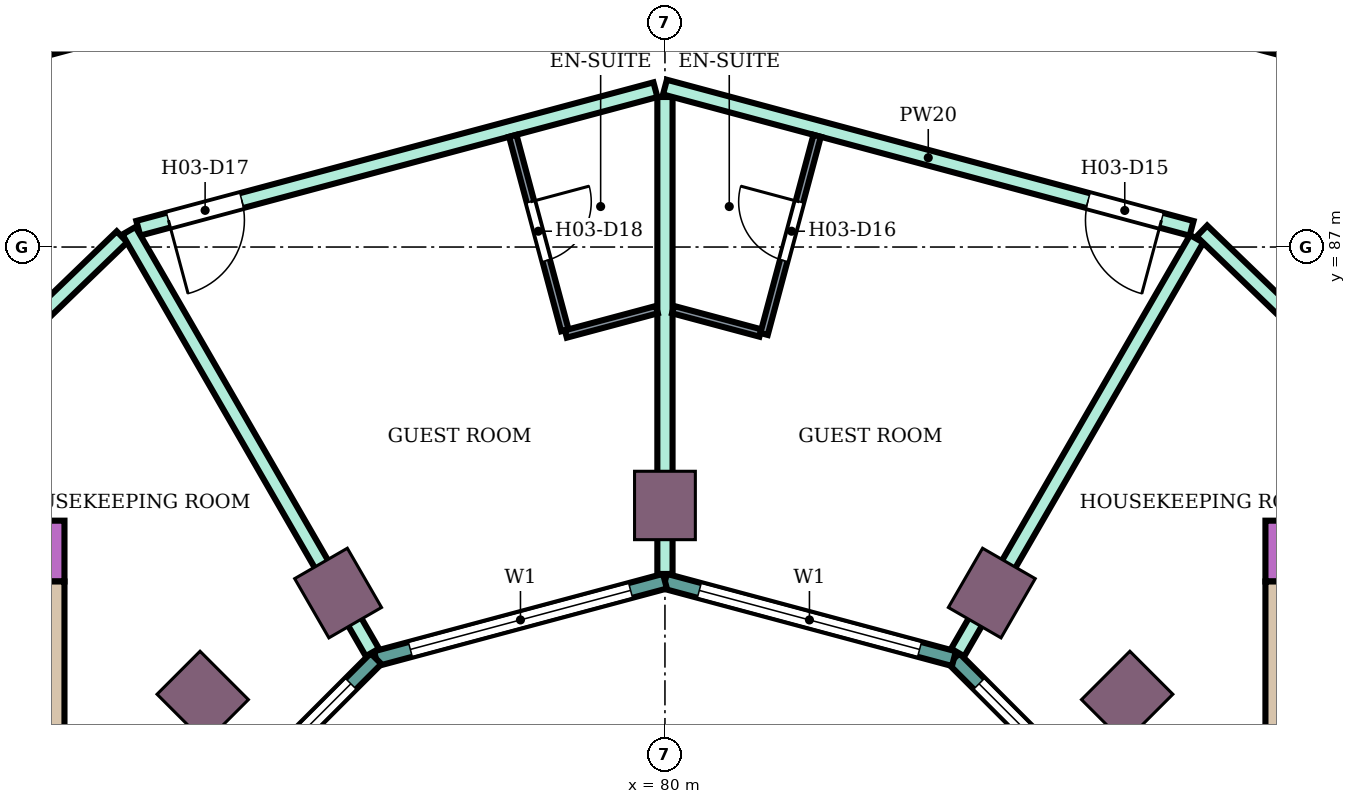
"""IFC4 building model, lengths in metres.
Left out: names, types, materials, properties, quantities, classifications, styles, units other than length and angle.
Written with IfcOpenShell. Run it as: python <this file> out.ifc"""

import sys

from ifc_helpers import new_model, si_unit, direction, frame, frame_2d, origin, origin_2d, place, context, subcontext, project, spatial, rectangle, extrude, element, fill, save


model = new_model("IFC4")
c1 = context("Model", 3, precision=1e-05, world=origin(), true_north=direction((0.0, 1.0)))
c2 = subcontext(c1, "Body", "Model", "MODEL_VIEW")
j1 = project(units=[si_unit("LENGTHUNIT", "METRE"), si_unit("PLANEANGLEUNIT", "RADIAN")], contexts=[c1])
p1 = place(None, origin())
s1 = spatial("IfcSite", under=j1, at=p1, CompositionType="ELEMENT")
p2 = place(p1, origin())
s2 = spatial("IfcBuilding", under=s1, at=p2, CompositionType="ELEMENT")
p3 = place(p2, frame((0.0, 0.0, 55.4)))
s3 = spatial("IfcBuildingStorey", under=s2, at=p3, CompositionType="ELEMENT", Elevation=55.4)
for number, where, z_axis, x_axis in (
    (1, (86.081, 81.081, 0.0), (0.0, 0.0, 1.0), (0.707, 0.707, 0.0)),
    (2, (84.3, 82.448, 0.0), (0.0, 0.0, 1.0), (0.5, 0.866, 0.0)),
    (3, (80.0, 83.6, 0.0), (0.0, 0.0, 1.0), (0.0, 1.0, 0.0)),
    (4, (75.7, 82.448, 0.0), (0.0, 0.0, 1.0), (-0.5, 0.866, 0.0)),
    (5, (73.919, 81.081, 0.0), (0.0, 0.0, 1.0), (-0.707, 0.707, 0.0)),
):
    element("IfcColumn", number, at=place(p3, frame(where, z_axis=z_axis, x_axis=x_axis)), inside=s3, PredefinedType="COLUMN", context=c2, shape_type="SweptSolid", body=[
        extrude(rectangle(XDim=0.9, YDim=0.8, at=origin_2d()), origin(), (0.0, 0.0, 1.0), 3.8),
    ])
p4 = place(p3, frame((87.9, 83.0, 0.0), z_axis=(0.0, 0.0, 1.0), x_axis=(1.0, 0.0, 0.0)))
e6 = element("IfcWall", 6, at=p4, inside=s3, PredefinedType="SHEAR", context=c2, shape_type="SweptSolid", body=[
    extrude(rectangle(XDim=14.7, YDim=0.8, at=frame_2d((7.35, 0.0))), origin(), (0.0, 0.0, 1.0), 3.48),
])
p5 = place(p4, frame((4.2, 0.0, 0.0)))
e7 = element("IfcOpeningElement", 7, at=p5, cuts=e6, PredefinedType="OPENING", context=c2, shape_type="SweptSolid", body=[
    extrude(rectangle(XDim=2.4, YDim=2.4, at=frame_2d((1.2, 1.2))), frame((0.0, 0.41, 0.0), z_axis=(0.0, -1.0, 0.0), x_axis=(1.0, 0.0, 0.0)), (0.0, 0.0, 1.0), 0.82),
])
p6 = place(p3, frame((88.125, 75.0, 0.0), z_axis=(0.0, 0.0, 1.0), x_axis=(0.0, 1.0, 0.0)))
e8 = element("IfcWall", 8, at=p6, inside=s3, PredefinedType="SHEAR", context=c2, shape_type="SweptSolid", body=[
    extrude(rectangle(XDim=7.6, YDim=0.45, at=frame_2d((3.8, 0.0))), origin(), (0.0, 0.0, 1.0), 3.48),
])
p7 = place(p3, frame((72.1, 83.0, 0.0), z_axis=(0.0, 0.0, 1.0), x_axis=(-1.0, 0.0, 0.0)))
e9 = element("IfcWall", 9, at=p7, inside=s3, PredefinedType="SHEAR", context=c2, shape_type="SweptSolid", body=[
    extrude(rectangle(XDim=14.7, YDim=0.8, at=frame_2d((7.35, 0.0))), origin(), (0.0, 0.0, 1.0), 3.48),
])
p8 = place(p7, frame((4.2, 0.0, 0.0)))
e10 = element("IfcOpeningElement", 10, at=p8, cuts=e9, PredefinedType="OPENING", context=c2, shape_type="SweptSolid", body=[
    extrude(rectangle(XDim=2.4, YDim=2.4, at=frame_2d((1.2, 1.2))), frame((0.0, 0.41, 0.0), z_axis=(0.0, -1.0, 0.0), x_axis=(1.0, 0.0, 0.0)), (0.0, 0.0, 1.0), 0.82),
])
p9 = place(p3, frame((71.875, 82.6, 0.0), z_axis=(0.0, 0.0, 1.0), x_axis=(0.0, -1.0, 0.0)))
e11 = element("IfcWall", 11, at=p9, inside=s3, PredefinedType="SHEAR", context=c2, shape_type="SweptSolid", body=[
    extrude(rectangle(XDim=7.6, YDim=0.45, at=frame_2d((3.8, 0.0))), origin(), (0.0, 0.0, 1.0), 3.48),
])
p10 = place(p3, frame((86.585, 78.802, 0.0), z_axis=(0.0, 0.0, 1.0), x_axis=(-0.707106781187, 0.707106781187, 0.0)))
e12 = element("IfcWall", 12, at=p10, inside=s3, PredefinedType="NOTDEFINED", context=c2, shape_type="SweptSolid", body=[
    extrude(rectangle(XDim=3.936, YDim=0.2, at=frame_2d((1.968, 0.0))), origin(), (0.0, 0.0, 1.0), 3.8),
])
p11 = place(p10, frame((0.468, 0.0, 0.9)))
e13 = element("IfcOpeningElement", 13, at=p11, cuts=e12, PredefinedType="OPENING", context=c2, shape_type="SweptSolid", body=[
    extrude(rectangle(XDim=3.0, YDim=2.3, at=frame_2d((1.5, 1.15))), frame((0.0, 0.11, 0.0), z_axis=(0.0, -1.0, 0.0), x_axis=(1.0, 0.0, 0.0)), (0.0, 0.0, 1.0), 0.22),
])
p12 = place(p3, frame((83.802, 81.585, 0.0), z_axis=(0.0, 0.0, 1.0), x_axis=(-0.965933654434, 0.258789828301, 0.0)))
e14 = element("IfcWall", 14, at=p12, inside=s3, PredefinedType="NOTDEFINED", context=c2, shape_type="SweptSolid", body=[
    extrude(rectangle(XDim=3.936, YDim=0.2, at=frame_2d((1.968, 0.0))), origin(), (0.0, 0.0, 1.0), 3.8),
])
p13 = place(p12, frame((0.468, 0.0, 0.9)))
e15 = element("IfcOpeningElement", 15, at=p13, cuts=e14, PredefinedType="OPENING", context=c2, shape_type="SweptSolid", body=[
    extrude(rectangle(XDim=3.0, YDim=2.3, at=frame_2d((1.5, 1.15))), frame((0.0, 0.11, 0.0), z_axis=(0.0, -1.0, 0.0), x_axis=(1.0, 0.0, 0.0)), (0.0, 0.0, 1.0), 0.22),
])
p14 = place(p3, frame((80.0, 82.604, 0.0), z_axis=(0.0, 0.0, 1.0), x_axis=(-0.965933654434, -0.258789828301, 0.0)))
e16 = element("IfcWall", 16, at=p14, inside=s3, PredefinedType="NOTDEFINED", context=c2, shape_type="SweptSolid", body=[
    extrude(rectangle(XDim=3.936, YDim=0.2, at=frame_2d((1.968, 0.0))), origin(), (0.0, 0.0, 1.0), 3.8),
])
p15 = place(p14, frame((0.468, 0.0, 0.9)))
e17 = element("IfcOpeningElement", 17, at=p15, cuts=e16, PredefinedType="OPENING", context=c2, shape_type="SweptSolid", body=[
    extrude(rectangle(XDim=3.0, YDim=2.3, at=frame_2d((1.5, 1.15))), frame((0.0, 0.11, 0.0), z_axis=(0.0, -1.0, 0.0), x_axis=(1.0, 0.0, 0.0)), (0.0, 0.0, 1.0), 0.22),
])
p16 = place(p3, frame((76.198, 81.585, 0.0), z_axis=(0.0, 0.0, 1.0), x_axis=(-0.707106781187, -0.707106781187, 0.0)))
e18 = element("IfcWall", 18, at=p16, inside=s3, PredefinedType="NOTDEFINED", context=c2, shape_type="SweptSolid", body=[
    extrude(rectangle(XDim=3.936, YDim=0.2, at=frame_2d((1.968, 0.0))), origin(), (0.0, 0.0, 1.0), 3.8),
])
p17 = place(p16, frame((0.468, 0.0, 0.9)))
e19 = element("IfcOpeningElement", 19, at=p17, cuts=e18, PredefinedType="OPENING", context=c2, shape_type="SweptSolid", body=[
    extrude(rectangle(XDim=3.0, YDim=2.3, at=frame_2d((1.5, 1.15))), frame((0.0, 0.11, 0.0), z_axis=(0.0, -1.0, 0.0), x_axis=(1.0, 0.0, 0.0)), (0.0, 0.0, 1.0), 0.22),
])
p18 = place(p3, frame((68.987, 83.4, 0.0), z_axis=(0.0, 0.0, 1.0), x_axis=(0.719547721855, 0.694442996922, 0.0)))
e20 = element("IfcWall", 20, at=p18, inside=s3, PredefinedType="PARTITIONING", context=c2, shape_type="SweptSolid", body=[
    extrude(rectangle(XDim=5.378, YDim=0.2, at=frame_2d((2.689, 0.0))), origin(), (0.0, 0.0, 1.0), 3.35),
])
p19 = place(p18, frame((2.294, 0.0, 0.0)))
e21 = element("IfcOpeningElement", 21, at=p19, cuts=e20, PredefinedType="OPENING", context=c2, shape_type="SweptSolid", body=[
    extrude(rectangle(XDim=0.9, YDim=2.1, at=frame_2d((0.45, 1.05))), frame((0.0, 0.11, 0.0), z_axis=(0.0, -1.0, 0.0), x_axis=(1.0, 0.0, 0.0)), (0.0, 0.0, 1.0), 0.22),
])
p20 = place(p3, frame((71.614, 89.55, 0.0), z_axis=(0.0, 0.0, 1.0), x_axis=(0.965967958589, 0.258661753994, 0.0)))
e22 = element("IfcWall", 22, at=p20, inside=s3, PredefinedType="PARTITIONING", context=c2, shape_type="SweptSolid", body=[
    extrude(rectangle(XDim=8.592, YDim=0.2, at=frame_2d((4.296, 0.0))), origin(), (0.0, 0.0, 1.0), 3.35),
])
p21 = place(p20, frame((0.55, 0.0, 0.0)))
e23 = element("IfcOpeningElement", 23, at=p21, cuts=e22, PredefinedType="OPENING", context=c2, shape_type="SweptSolid", body=[
    extrude(rectangle(XDim=1.0, YDim=2.1, at=frame_2d((0.5, 1.05))), frame((0.0, 0.11, 0.0), z_axis=(0.0, -1.0, 0.0), x_axis=(1.0, 0.0, 0.0)), (0.0, 0.0, 1.0), 0.22),
])
p22 = place(p3, frame((73.071, 87.247, 0.0), z_axis=(0.0, 0.0, 1.0), x_axis=(0.965931651205, 0.258797305243, 0.0)))
e24 = element("IfcWall", 24, at=p22, inside=s3, PredefinedType="PARTITIONING", context=c2, shape_type="SweptSolid", body=[
    extrude(rectangle(XDim=7.043, YDim=0.2, at=frame_2d((3.521, 0.0))), origin(), (0.0, 0.0, 1.0), 3.35),
])
p23 = place(p22, frame((0.41, 0.0, 0.0)))
e25 = element("IfcOpeningElement", 25, at=p23, cuts=e24, PredefinedType="OPENING", context=c2, shape_type="SweptSolid", body=[
    extrude(rectangle(XDim=1.0, YDim=2.1, at=frame_2d((0.5, 1.05))), frame((0.0, 0.11, 0.0), z_axis=(0.0, -1.0, 0.0), x_axis=(1.0, 0.0, 0.0)), (0.0, 0.0, 1.0), 0.22),
])
p24 = place(p3, frame((72.949, 87.214, 0.0), z_axis=(0.0, 0.0, 1.0), x_axis=(0.499927021214, -0.866067534006, 0.0)))
e26 = element("IfcWall", 26, at=p24, inside=s3, PredefinedType="PARTITIONING", context=c2, shape_type="SweptSolid", body=[
    extrude(rectangle(XDim=6.405, YDim=0.2, at=frame_2d((3.203, 0.0))), origin(), (0.0, 0.0, 1.0), 3.35),
])
p25 = place(p3, frame((80.0, 82.699, 0.0), z_axis=(0.0, 0.0, 1.0), x_axis=(0.0, 1.0, 0.0)))
e27 = element("IfcWall", 27, at=p25, inside=s3, PredefinedType="PARTITIONING", context=c2, shape_type="SweptSolid", body=[
    extrude(rectangle(XDim=6.275, YDim=0.2, at=frame_2d((3.138, 0.0))), origin(), (0.0, 0.0, 1.0), 3.35),
])
p26 = place(p3, frame((80.0, 89.104, 0.0), z_axis=(0.0, 0.0, 1.0), x_axis=(0.965856548257, -0.259077455964, 0.0)))
e28 = element("IfcWall", 28, at=p26, inside=s3, PredefinedType="PARTITIONING", context=c2, shape_type="SweptSolid", body=[
    extrude(rectangle(XDim=7.173, YDim=0.2, at=frame_2d((3.586, 0.0))), origin(), (0.0, 0.0, 1.0), 3.35),
])
p27 = place(p26, frame((5.763, 0.0, 0.0)))
e29 = element("IfcOpeningElement", 29, at=p27, cuts=e28, PredefinedType="OPENING", context=c2, shape_type="SweptSolid", body=[
    extrude(rectangle(XDim=1.0, YDim=2.1, at=frame_2d((0.5, 1.05))), frame((0.0, 0.11, 0.0), z_axis=(0.0, -1.0, 0.0), x_axis=(1.0, 0.0, 0.0)), (0.0, 0.0, 1.0), 0.22),
])
p28 = place(p3, frame((80.0, 91.797, 0.0), z_axis=(0.0, 0.0, 1.0), x_axis=(0.965857042792, -0.259075612301, 0.0)))
e30 = element("IfcWall", 30, at=p28, inside=s3, PredefinedType="PARTITIONING", context=c2, shape_type="SweptSolid", body=[
    extrude(rectangle(XDim=8.602, YDim=0.2, at=frame_2d((4.301, 0.0))), origin(), (0.0, 0.0, 1.0), 3.35),
])
p29 = place(p28, frame((4.877, 0.0, 0.0)))
e31 = element("IfcOpeningElement", 31, at=p29, cuts=e30, PredefinedType="OPENING", context=c2, shape_type="SweptSolid", body=[
    extrude(rectangle(XDim=1.0, YDim=2.1, at=frame_2d((0.5, 1.05))), frame((0.0, 0.11, 0.0), z_axis=(0.0, -1.0, 0.0), x_axis=(1.0, 0.0, 0.0)), (0.0, 0.0, 1.0), 0.22),
])
p30 = place(p28, frame((2.817, 0.0, 0.0)))
e32 = element("IfcOpeningElement", 32, at=p30, cuts=e30, PredefinedType="OPENING", context=c2, shape_type="SweptSolid", body=[
    extrude(rectangle(XDim=1.0, YDim=2.1, at=frame_2d((0.5, 1.05))), frame((0.0, 0.11, 0.0), z_axis=(0.0, -1.0, 0.0), x_axis=(1.0, 0.0, 0.0)), (0.0, 0.0, 1.0), 0.22),
])
p31 = place(p3, frame((83.851, 81.666, 0.0), z_axis=(0.0, 0.0, 1.0), x_axis=(0.500253653624, 0.865878907259, 0.0)))
e33 = element("IfcWall", 33, at=p31, inside=s3, PredefinedType="PARTITIONING", context=c2, shape_type="SweptSolid", body=[
    extrude(rectangle(XDim=6.285, YDim=0.2, at=frame_2d((3.143, 0.0))), origin(), (0.0, 0.0, 1.0), 3.35),
])
p32 = place(p3, frame((87.064, 87.211, 0.0), z_axis=(0.0, 0.0, 1.0), x_axis=(0.719562412484, -0.694427774891, 0.0)))
e34 = element("IfcWall", 34, at=p32, inside=s3, PredefinedType="PARTITIONING", context=c2, shape_type="SweptSolid", body=[
    extrude(rectangle(XDim=5.488, YDim=0.2, at=frame_2d((2.744, 0.0))), origin(), (0.0, 0.0, 1.0), 3.35),
])
p33 = place(p32, frame((2.294, 0.0, 0.0)))
e35 = element("IfcOpeningElement", 35, at=p33, cuts=e34, PredefinedType="OPENING", context=c2, shape_type="SweptSolid", body=[
    extrude(rectangle(XDim=0.9, YDim=2.1, at=frame_2d((0.45, 1.05))), frame((0.0, 0.11, 0.0), z_axis=(0.0, -1.0, 0.0), x_axis=(1.0, 0.0, 0.0)), (0.0, 0.0, 1.0), 0.22),
])
p34 = place(p3, frame((77.998, 88.463, 0.0), z_axis=(0.0, 0.0, 1.0), x_axis=(0.258677737588, -0.965963678446, 0.0)))
e36 = element("IfcWall", 36, at=p34, inside=s3, PredefinedType="PARTITIONING", context=c2, shape_type="SweptSolid", body=[
    extrude(rectangle(XDim=2.649, YDim=0.1, at=frame_2d((1.325, 0.0))), origin(), (0.0, 0.0, 1.0), 3.35),
])
p35 = place(p34, frame((0.9, 0.0, 0.0)))
e37 = element("IfcOpeningElement", 37, at=p35, cuts=e36, PredefinedType="OPENING", context=c2, shape_type="SweptSolid", body=[
    extrude(rectangle(XDim=0.8, YDim=2.1, at=frame_2d((0.4, 1.05))), frame((0.0, 0.06, 0.0), z_axis=(0.0, -1.0, 0.0), x_axis=(1.0, 0.0, 0.0)), (0.0, 0.0, 1.0), 0.12),
])
p36 = place(p3, frame((78.696, 85.856, 0.0), z_axis=(0.0, 0.0, 1.0), x_axis=(0.966002513606, 0.258532674351, 0.0)))
e38 = element("IfcWall", 38, at=p36, inside=s3, PredefinedType="PARTITIONING", context=c2, shape_type="SweptSolid", body=[
    extrude(rectangle(XDim=1.24, YDim=0.1, at=frame_2d((0.62, 0.0))), origin(), (0.0, 0.0, 1.0), 3.35),
])
p37 = place(p3, frame((80.106, 86.177, 0.0), z_axis=(0.0, 0.0, 1.0), x_axis=(0.966002973184, -0.258530957139, 0.0)))
e39 = element("IfcWall", 39, at=p37, inside=s3, PredefinedType="PARTITIONING", context=c2, shape_type="SweptSolid", body=[
    extrude(rectangle(XDim=1.19, YDim=0.1, at=frame_2d((0.595, 0.0))), origin(), (0.0, 0.0, 1.0), 3.35),
])
p38 = place(p3, frame((81.304, 85.856, 0.0), z_axis=(0.0, 0.0, 1.0), x_axis=(0.25867580527, 0.965964195904, 0.0)))
e40 = element("IfcWall", 40, at=p38, inside=s3, PredefinedType="PARTITIONING", context=c2, shape_type="SweptSolid", body=[
    extrude(rectangle(XDim=2.699, YDim=0.1, at=frame_2d((1.35, 0.0))), origin(), (0.0, 0.0, 1.0), 3.35),
])
p39 = place(p38, frame((1.0, 0.0, 0.0)))
e41 = element("IfcOpeningElement", 41, at=p39, cuts=e40, PredefinedType="OPENING", context=c2, shape_type="SweptSolid", body=[
    extrude(rectangle(XDim=0.8, YDim=2.1, at=frame_2d((0.4, 1.05))), frame((0.0, 0.06, 0.0), z_axis=(0.0, -1.0, 0.0), x_axis=(1.0, 0.0, 0.0)), (0.0, 0.0, 1.0), 0.12),
])
p40 = place(p11, origin())
e42 = element("IfcWindow", 42, at=p40, inside=s3, PartitioningType="SINGLE_PANEL", PredefinedType="WINDOW", context=c2, shape_type="SweptSolid", body=[
    extrude(rectangle(XDim=3.0, YDim=2.3, at=frame_2d((1.5, 1.15))), frame((0.0, 0.03, 0.0), z_axis=(0.0, -1.0, 0.0), x_axis=(1.0, 0.0, 0.0)), (0.0, 0.0, 1.0), 0.06),
])
fill(e13, e42)
p41 = place(p13, origin())
e43 = element("IfcWindow", 43, at=p41, inside=s3, PartitioningType="SINGLE_PANEL", PredefinedType="WINDOW", context=c2, shape_type="SweptSolid", body=[
    extrude(rectangle(XDim=3.0, YDim=2.3, at=frame_2d((1.5, 1.15))), frame((0.0, 0.03, 0.0), z_axis=(0.0, -1.0, 0.0), x_axis=(1.0, 0.0, 0.0)), (0.0, 0.0, 1.0), 0.06),
])
fill(e15, e43)
p42 = place(p15, origin())
e44 = element("IfcWindow", 44, at=p42, inside=s3, PartitioningType="SINGLE_PANEL", PredefinedType="WINDOW", context=c2, shape_type="SweptSolid", body=[
    extrude(rectangle(XDim=3.0, YDim=2.3, at=frame_2d((1.5, 1.15))), frame((0.0, 0.03, 0.0), z_axis=(0.0, -1.0, 0.0), x_axis=(1.0, 0.0, 0.0)), (0.0, 0.0, 1.0), 0.06),
])
fill(e17, e44)
p43 = place(p17, origin())
e45 = element("IfcWindow", 45, at=p43, inside=s3, PartitioningType="SINGLE_PANEL", PredefinedType="WINDOW", context=c2, shape_type="SweptSolid", body=[
    extrude(rectangle(XDim=3.0, YDim=2.3, at=frame_2d((1.5, 1.15))), frame((0.0, 0.03, 0.0), z_axis=(0.0, -1.0, 0.0), x_axis=(1.0, 0.0, 0.0)), (0.0, 0.0, 1.0), 0.06),
])
fill(e19, e45)
p44 = place(p27, frame((1.0, 0.0, 0.0), z_axis=(0.0, 0.0, 1.0), x_axis=(-1.0, 0.0, 0.0)))
e46 = element("IfcDoor", 46, at=p44, inside=s3, OperationType="SINGLE_SWING_LEFT", PredefinedType="DOOR", context=c2, shape_type="SweptSolid", body=[
    extrude(rectangle(XDim=1.0, YDim=2.1, at=frame_2d((0.5, 1.05))), frame((0.0, 0.025, 0.0), z_axis=(0.0, -1.0, 0.0), x_axis=(1.0, 0.0, 0.0)), (0.0, 0.0, 1.0), 0.05),
])
fill(e29, e46)
p45 = place(p39, origin())
e47 = element("IfcDoor", 47, at=p45, inside=s3, OperationType="SINGLE_SWING_RIGHT", PredefinedType="DOOR", context=c2, shape_type="SweptSolid", body=[
    extrude(rectangle(XDim=0.8, YDim=2.1, at=frame_2d((0.4, 1.05))), frame((0.0, 0.025, 0.0), z_axis=(0.0, -1.0, 0.0), x_axis=(1.0, 0.0, 0.0)), (0.0, 0.0, 1.0), 0.05),
])
fill(e41, e47)
p46 = place(p23, frame((1.0, 0.0, 0.0), z_axis=(0.0, 0.0, 1.0), x_axis=(-1.0, 0.0, 0.0)))
e48 = element("IfcDoor", 48, at=p46, inside=s3, OperationType="SINGLE_SWING_RIGHT", PredefinedType="DOOR", context=c2, shape_type="SweptSolid", body=[
    extrude(rectangle(XDim=1.0, YDim=2.1, at=frame_2d((0.5, 1.05))), frame((0.0, 0.025, 0.0), z_axis=(0.0, -1.0, 0.0), x_axis=(1.0, 0.0, 0.0)), (0.0, 0.0, 1.0), 0.05),
])
fill(e25, e48)
p47 = place(p35, origin())
e49 = element("IfcDoor", 49, at=p47, inside=s3, OperationType="SINGLE_SWING_LEFT", PredefinedType="DOOR", context=c2, shape_type="SweptSolid", body=[
    extrude(rectangle(XDim=0.8, YDim=2.1, at=frame_2d((0.4, 1.05))), frame((0.0, 0.025, 0.0), z_axis=(0.0, -1.0, 0.0), x_axis=(1.0, 0.0, 0.0)), (0.0, 0.0, 1.0), 0.05),
])
fill(e37, e49)
save(model, sys.argv[1])
